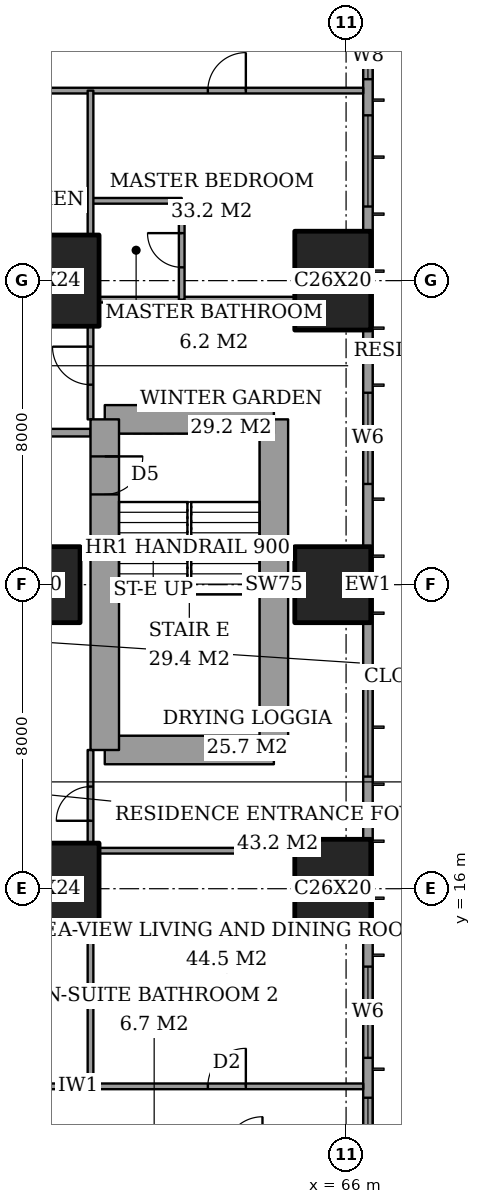
"""IFC4 building model, lengths in metres.
Left out: names, types, materials, properties, quantities, classifications, styles, units other than length and angle.
Written with IfcOpenShell. Run it as: python <this file> out.ifc"""

import sys

from ifc_helpers import new_model, si_unit, direction, frame, frame_2d, origin, origin_2d, place, context, subcontext, project, spatial, rectangle, extrude, element, fill, save


model = new_model("IFC4")
c1 = context("Model", 3, precision=1e-05, world=origin(), true_north=direction((0.0, 1.0)))
c2 = subcontext(c1, "Body", "Model", "MODEL_VIEW")
j1 = project(units=[si_unit("LENGTHUNIT", "METRE"), si_unit("PLANEANGLEUNIT", "RADIAN")], contexts=[c1])
p1 = place(None, origin())
s1 = spatial("IfcSite", under=j1, at=p1, CompositionType="ELEMENT")
p2 = place(p1, origin())
s2 = spatial("IfcBuilding", under=s1, at=p2, CompositionType="ELEMENT")
p3 = place(p2, frame((0.0, 0.0, 47.6)))
s3 = spatial("IfcBuildingStorey", under=s2, at=p3, CompositionType="ELEMENT", Elevation=47.6)
p4 = place(p3, frame((58.0, 16.0, 0.0), z_axis=(0.0, 0.0, 1.0), x_axis=(1.0, 0.0, 0.0)))
e1 = element("IfcColumn", 1, at=p4, inside=s3, PredefinedType="COLUMN", context=c2, shape_type="SweptSolid", body=[
    extrude(rectangle(XDim=3.0, YDim=2.4, at=origin_2d()), origin(), (0.0, 0.0, 1.0), 3.6),
])
p5 = place(p3, frame((58.0, 24.0, 0.0), z_axis=(0.0, 0.0, 1.0), x_axis=(1.0, 0.0, 0.0)))
e2 = element("IfcColumn", 2, at=p5, inside=s3, PredefinedType="COLUMN", context=c2, shape_type="SweptSolid", body=[
    extrude(rectangle(XDim=2.0, YDim=2.0, at=origin_2d()), origin(), (0.0, 0.0, 1.0), 3.6),
])
p6 = place(p3, frame((58.0, 32.0, 0.0), z_axis=(0.0, 0.0, 1.0), x_axis=(1.0, 0.0, 0.0)))
e3 = element("IfcColumn", 3, at=p6, inside=s3, PredefinedType="COLUMN", context=c2, shape_type="SweptSolid", body=[
    extrude(rectangle(XDim=3.0, YDim=2.4, at=origin_2d()), origin(), (0.0, 0.0, 1.0), 3.6),
])
p7 = place(p3, frame((65.65, 16.0, 0.0), z_axis=(0.0, 0.0, 1.0), x_axis=(0.0, 1.0, 0.0)))
e4 = element("IfcColumn", 4, at=p7, inside=s3, PredefinedType="COLUMN", context=c2, shape_type="SweptSolid", body=[
    extrude(rectangle(XDim=2.6, YDim=2.0, at=origin_2d()), origin(), (0.0, 0.0, 1.0), 3.6),
])
p8 = place(p3, frame((65.65, 24.0, 0.0), z_axis=(0.0, 0.0, 1.0), x_axis=(1.0, 0.0, 0.0)))
e5 = element("IfcColumn", 5, at=p8, inside=s3, PredefinedType="COLUMN", context=c2, shape_type="SweptSolid", body=[
    extrude(rectangle(XDim=2.0, YDim=2.0, at=origin_2d()), origin(), (0.0, 0.0, 1.0), 3.6),
])
p9 = place(p3, frame((65.65, 32.0, 0.0), z_axis=(0.0, 0.0, 1.0), x_axis=(0.0, 1.0, 0.0)))
e6 = element("IfcColumn", 6, at=p9, inside=s3, PredefinedType="COLUMN", context=c2, shape_type="SweptSolid", body=[
    extrude(rectangle(XDim=2.6, YDim=2.0, at=origin_2d()), origin(), (0.0, 0.0, 1.0), 3.6),
])
p10 = place(p3, frame((59.65, 19.65, 0.0), z_axis=(0.0, 0.0, 1.0), x_axis=(1.0, 0.0, 0.0)))
e7 = element("IfcWall", 7, at=p10, inside=s3, PredefinedType="SHEAR", context=c2, shape_type="SweptSolid", body=[
    extrude(rectangle(XDim=4.45, YDim=0.75, at=frame_2d((2.225, 0.0))), origin(), (0.0, 0.0, 1.0), 3.6),
])
p11 = place(p3, frame((64.1, 19.65, 0.0), z_axis=(0.0, 0.0, 1.0), x_axis=(0.0, 1.0, 0.0)))
e8 = element("IfcWall", 8, at=p11, inside=s3, PredefinedType="SHEAR", context=c2, shape_type="SweptSolid", body=[
    extrude(rectangle(XDim=8.7, YDim=0.75, at=frame_2d((4.35, 0.0))), origin(), (0.0, 0.0, 1.0), 3.6),
])
p12 = place(p3, frame((64.1, 28.35, 0.0), z_axis=(0.0, 0.0, 1.0), x_axis=(-1.0, 0.0, 0.0)))
e9 = element("IfcWall", 9, at=p12, inside=s3, PredefinedType="SHEAR", context=c2, shape_type="SweptSolid", body=[
    extrude(rectangle(XDim=4.45, YDim=0.75, at=frame_2d((2.225, 0.0))), origin(), (0.0, 0.0, 1.0), 3.6),
])
p13 = place(p3, frame((59.65, 28.35, 0.0), z_axis=(0.0, 0.0, 1.0), x_axis=(0.0, -1.0, 0.0)))
e10 = element("IfcWall", 10, at=p13, inside=s3, PredefinedType="SHEAR", context=c2, shape_type="SweptSolid", body=[
    extrude(rectangle(XDim=8.7, YDim=0.75, at=frame_2d((4.35, 0.0))), origin(), (0.0, 0.0, 1.0), 3.6),
])
p14 = place(p13, frame((0.975, 0.0, 0.0)))
e11 = element("IfcOpeningElement", 11, at=p14, cuts=e10, PredefinedType="OPENING", context=c2, shape_type="SweptSolid", body=[
    extrude(rectangle(XDim=1.0, YDim=2.1, at=frame_2d((0.5, 1.05))), frame((0.0, 0.385, 0.0), z_axis=(0.0, -1.0, 0.0), x_axis=(1.0, 0.0, 0.0)), (0.0, 0.0, 1.0), 0.77),
])
p15 = place(p3, frame((66.575, 3.175, 0.0), z_axis=(0.0, 0.0, 1.0), x_axis=(0.0, 1.0, 0.0)))
e12 = element("IfcWall", 12, at=p15, inside=s3, PredefinedType="SOLIDWALL", context=c2, shape_type="SweptSolid", body=[
    extrude(rectangle(XDim=41.65, YDim=0.25, at=frame_2d((20.825, 0.0))), origin(), (0.0, 0.0, 1.0), 3.6),
])
p16 = place(p15, frame((0.775, 0.0, 0.6)))
e13 = element("IfcOpeningElement", 13, at=p16, cuts=e12, PredefinedType="OPENING", context=c2, shape_type="SweptSolid", body=[
    extrude(rectangle(XDim=2.4, YDim=2.0, at=frame_2d((1.2, 1.0))), frame((0.0, 0.135, 0.0), z_axis=(0.0, -1.0, 0.0), x_axis=(1.0, 0.0, 0.0)), (0.0, 0.0, 1.0), 0.27),
])
p17 = place(p15, frame((6.125, 0.0, 0.6)))
e14 = element("IfcOpeningElement", 14, at=p17, cuts=e12, PredefinedType="OPENING", context=c2, shape_type="SweptSolid", body=[
    extrude(rectangle(XDim=1.2, YDim=2.0, at=frame_2d((0.6, 1.0))), frame((0.0, 0.135, 0.0), z_axis=(0.0, -1.0, 0.0), x_axis=(1.0, 0.0, 0.0)), (0.0, 0.0, 1.0), 0.27),
])
p18 = place(p15, frame((8.375, 0.0, 0.6)))
e15 = element("IfcOpeningElement", 15, at=p18, cuts=e12, PredefinedType="OPENING", context=c2, shape_type="SweptSolid", body=[
    extrude(rectangle(XDim=2.4, YDim=2.0, at=frame_2d((1.2, 1.0))), frame((0.0, 0.135, 0.0), z_axis=(0.0, -1.0, 0.0), x_axis=(1.0, 0.0, 0.0)), (0.0, 0.0, 1.0), 0.27),
])
p19 = place(p15, frame((15.775, 0.0, 0.6)))
e16 = element("IfcOpeningElement", 16, at=p19, cuts=e12, PredefinedType="OPENING", context=c2, shape_type="SweptSolid", body=[
    extrude(rectangle(XDim=2.4, YDim=2.0, at=frame_2d((1.2, 1.0))), frame((0.0, 0.135, 0.0), z_axis=(0.0, -1.0, 0.0), x_axis=(1.0, 0.0, 0.0)), (0.0, 0.0, 1.0), 0.27),
])
p20 = place(p15, frame((23.475, 0.0, 0.6)))
e17 = element("IfcOpeningElement", 17, at=p20, cuts=e12, PredefinedType="OPENING", context=c2, shape_type="SweptSolid", body=[
    extrude(rectangle(XDim=2.4, YDim=2.0, at=frame_2d((1.2, 1.0))), frame((0.0, 0.135, 0.0), z_axis=(0.0, -1.0, 0.0), x_axis=(1.0, 0.0, 0.0)), (0.0, 0.0, 1.0), 0.27),
])
p21 = place(p15, frame((30.775, 0.0, 0.6)))
e18 = element("IfcOpeningElement", 18, at=p21, cuts=e12, PredefinedType="OPENING", context=c2, shape_type="SweptSolid", body=[
    extrude(rectangle(XDim=2.4, YDim=2.0, at=frame_2d((1.2, 1.0))), frame((0.0, 0.135, 0.0), z_axis=(0.0, -1.0, 0.0), x_axis=(1.0, 0.0, 0.0)), (0.0, 0.0, 1.0), 0.27),
])
p22 = place(p15, frame((34.125, 0.0, 0.6)))
e19 = element("IfcOpeningElement", 19, at=p22, cuts=e12, PredefinedType="OPENING", context=c2, shape_type="SweptSolid", body=[
    extrude(rectangle(XDim=1.2, YDim=2.0, at=frame_2d((0.6, 1.0))), frame((0.0, 0.135, 0.0), z_axis=(0.0, -1.0, 0.0), x_axis=(1.0, 0.0, 0.0)), (0.0, 0.0, 1.0), 0.27),
])
p23 = place(p15, frame((38.475, 0.0, 0.6)))
e20 = element("IfcOpeningElement", 20, at=p23, cuts=e12, PredefinedType="OPENING", context=c2, shape_type="SweptSolid", body=[
    extrude(rectangle(XDim=2.4, YDim=2.0, at=frame_2d((1.2, 1.0))), frame((0.0, 0.135, 0.0), z_axis=(0.0, -1.0, 0.0), x_axis=(1.0, 0.0, 0.0)), (0.0, 0.0, 1.0), 0.27),
])
p24 = place(p3, frame((41.439, 10.8, 0.0), z_axis=(0.0, 0.0, 1.0), x_axis=(1.0, 0.0, 0.0)))
e21 = element("IfcWall", 21, at=p24, inside=s3, PredefinedType="PARTITIONING", context=c2, shape_type="SweptSolid", body=[
    extrude(rectangle(XDim=25.011, YDim=0.15, at=frame_2d((12.505, 0.0))), origin(), (0.0, 0.0, 1.0), 3.35),
])
p25 = place(p24, frame((12.361, 0.0, 0.0)))
e22 = element("IfcOpeningElement", 22, at=p25, cuts=e21, PredefinedType="OPENING", context=c2, shape_type="SweptSolid", body=[
    extrude(rectangle(XDim=1.0, YDim=2.1, at=frame_2d((0.5, 1.05))), frame((0.0, 0.085, 0.0), z_axis=(0.0, -1.0, 0.0), x_axis=(1.0, 0.0, 0.0)), (0.0, 0.0, 1.0), 0.17),
])
p26 = place(p24, frame((20.924, 0.0, 0.0)))
e23 = element("IfcOpeningElement", 23, at=p26, cuts=e21, PredefinedType="OPENING", context=c2, shape_type="SweptSolid", body=[
    extrude(rectangle(XDim=1.0, YDim=2.1, at=frame_2d((0.5, 1.05))), frame((0.0, 0.085, 0.0), z_axis=(0.0, -1.0, 0.0), x_axis=(1.0, 0.0, 0.0)), (0.0, 0.0, 1.0), 0.17),
])
p27 = place(p24, frame((15.448, 0.0, 0.0)))
e24 = element("IfcOpeningElement", 24, at=p27, cuts=e21, PredefinedType="OPENING", context=c2, shape_type="SweptSolid", body=[
    extrude(rectangle(XDim=0.9, YDim=2.1, at=frame_2d((0.45, 1.05))), frame((0.0, 0.085, 0.0), z_axis=(0.0, -1.0, 0.0), x_axis=(1.0, 0.0, 0.0)), (0.0, 0.0, 1.0), 0.17),
])
p28 = place(p24, frame((9.961, 0.0, 0.0)))
e25 = element("IfcOpeningElement", 25, at=p28, cuts=e21, PredefinedType="OPENING", context=c2, shape_type="SweptSolid", body=[
    extrude(rectangle(XDim=1.0, YDim=2.1, at=frame_2d((0.5, 1.05))), frame((0.0, 0.085, 0.0), z_axis=(0.0, -1.0, 0.0), x_axis=(1.0, 0.0, 0.0)), (0.0, 0.0, 1.0), 0.17),
])
p29 = place(p24, frame((7.361, 0.0, 0.0)))
e26 = element("IfcOpeningElement", 26, at=p29, cuts=e21, PredefinedType="OPENING", context=c2, shape_type="SweptSolid", body=[
    extrude(rectangle(XDim=1.0, YDim=2.1, at=frame_2d((0.5, 1.05))), frame((0.0, 0.085, 0.0), z_axis=(0.0, -1.0, 0.0), x_axis=(1.0, 0.0, 0.0)), (0.0, 0.0, 1.0), 0.17),
])
p30 = place(p24, frame((2.836, 0.0, 0.0)))
e27 = element("IfcOpeningElement", 27, at=p30, cuts=e21, PredefinedType="OPENING", context=c2, shape_type="SweptSolid", body=[
    extrude(rectangle(XDim=1.0, YDim=2.1, at=frame_2d((0.5, 1.05))), frame((0.0, 0.085, 0.0), z_axis=(0.0, -1.0, 0.0), x_axis=(1.0, 0.0, 0.0)), (0.0, 0.0, 1.0), 0.17),
])
p31 = place(p3, frame((59.5, 17.0, 0.0), z_axis=(0.0, 0.0, 1.0), x_axis=(1.0, 0.0, 0.0)))
e28 = element("IfcWall", 28, at=p31, inside=s3, PredefinedType="PARTITIONING", context=c2, shape_type="SweptSolid", body=[
    extrude(rectangle(XDim=5.15, YDim=0.15, at=frame_2d((2.575, 0.0))), origin(), (0.0, 0.0, 1.0), 3.35),
])
p32 = place(p3, frame((42.0, 28.0, 0.0), z_axis=(0.0, 0.0, 1.0), x_axis=(1.0, 0.0, 0.0)))
e29 = element("IfcWall", 29, at=p32, inside=s3, PredefinedType="PARTITIONING", context=c2, shape_type="SweptSolid", body=[
    extrude(rectangle(XDim=17.275, YDim=0.2, at=frame_2d((8.637, 0.0))), origin(), (0.0, 0.0, 1.0), 3.35),
])
p33 = place(p32, frame((9.2, 0.0, 0.0)))
e30 = element("IfcOpeningElement", 30, at=p33, cuts=e29, PredefinedType="OPENING", context=c2, shape_type="SweptSolid", body=[
    extrude(rectangle(XDim=1.2, YDim=2.4, at=frame_2d((0.6, 1.2))), frame((0.0, 0.11, 0.0), z_axis=(0.0, -1.0, 0.0), x_axis=(1.0, 0.0, 0.0)), (0.0, 0.0, 1.0), 0.22),
])
p34 = place(p3, frame((59.5, 31.5, 0.0), z_axis=(0.0, 0.0, 1.0), x_axis=(1.0, 0.0, 0.0)))
e31 = element("IfcWall", 31, at=p34, inside=s3, PredefinedType="PARTITIONING", context=c2, shape_type="SweptSolid", body=[
    extrude(rectangle(XDim=5.15, YDim=0.15, at=frame_2d((2.575, 0.0))), origin(), (0.0, 0.0, 1.0), 3.35),
])
p35 = place(p3, frame((59.275, 34.1, 0.0), z_axis=(0.0, 0.0, 1.0), x_axis=(1.0, 0.0, 0.0)))
e32 = element("IfcWall", 32, at=p35, inside=s3, PredefinedType="PARTITIONING", context=c2, shape_type="SweptSolid", body=[
    extrude(rectangle(XDim=2.4, YDim=0.15, at=frame_2d((1.2, 0.0))), origin(), (0.0, 0.0, 1.0), 3.35),
])
p36 = place(p3, frame((41.439, 37.0, 0.0), z_axis=(0.0, 0.0, 1.0), x_axis=(1.0, 0.0, 0.0)))
e33 = element("IfcWall", 33, at=p36, inside=s3, PredefinedType="PARTITIONING", context=c2, shape_type="SweptSolid", body=[
    extrude(rectangle(XDim=25.011, YDim=0.15, at=frame_2d((12.505, 0.0))), origin(), (0.0, 0.0, 1.0), 3.35),
])
p37 = place(p36, frame((12.561, 0.0, 0.0)))
e34 = element("IfcOpeningElement", 34, at=p37, cuts=e33, PredefinedType="OPENING", context=c2, shape_type="SweptSolid", body=[
    extrude(rectangle(XDim=1.0, YDim=2.1, at=frame_2d((0.5, 1.05))), frame((0.0, 0.085, 0.0), z_axis=(0.0, -1.0, 0.0), x_axis=(1.0, 0.0, 0.0)), (0.0, 0.0, 1.0), 0.17),
])
p38 = place(p36, frame((20.924, 0.0, 0.0)))
e35 = element("IfcOpeningElement", 35, at=p38, cuts=e33, PredefinedType="OPENING", context=c2, shape_type="SweptSolid", body=[
    extrude(rectangle(XDim=1.0, YDim=2.1, at=frame_2d((0.5, 1.05))), frame((0.0, 0.085, 0.0), z_axis=(0.0, -1.0, 0.0), x_axis=(1.0, 0.0, 0.0)), (0.0, 0.0, 1.0), 0.17),
])
p39 = place(p36, frame((15.499, 0.0, 0.0)))
e36 = element("IfcOpeningElement", 36, at=p39, cuts=e33, PredefinedType="OPENING", context=c2, shape_type="SweptSolid", body=[
    extrude(rectangle(XDim=1.0, YDim=2.1, at=frame_2d((0.5, 1.05))), frame((0.0, 0.085, 0.0), z_axis=(0.0, -1.0, 0.0), x_axis=(1.0, 0.0, 0.0)), (0.0, 0.0, 1.0), 0.17),
])
p40 = place(p36, frame((8.761, 0.0, 0.0)))
e37 = element("IfcOpeningElement", 37, at=p40, cuts=e33, PredefinedType="OPENING", context=c2, shape_type="SweptSolid", body=[
    extrude(rectangle(XDim=1.0, YDim=2.1, at=frame_2d((0.5, 1.05))), frame((0.0, 0.085, 0.0), z_axis=(0.0, -1.0, 0.0), x_axis=(1.0, 0.0, 0.0)), (0.0, 0.0, 1.0), 0.17),
])
p41 = place(p36, frame((2.836, 0.0, 0.0)))
e38 = element("IfcOpeningElement", 38, at=p41, cuts=e33, PredefinedType="OPENING", context=c2, shape_type="SweptSolid", body=[
    extrude(rectangle(XDim=1.0, YDim=2.1, at=frame_2d((0.5, 1.05))), frame((0.0, 0.085, 0.0), z_axis=(0.0, -1.0, 0.0), x_axis=(1.0, 0.0, 0.0)), (0.0, 0.0, 1.0), 0.17),
])
p42 = place(p3, frame((59.275, 10.8, 0.0), z_axis=(0.0, 0.0, 1.0), x_axis=(0.0, 1.0, 0.0)))
e39 = element("IfcWall", 39, at=p42, inside=s3, PredefinedType="PARTITIONING", context=c2, shape_type="SweptSolid", body=[
    extrude(rectangle(XDim=4.0, YDim=0.15, at=frame_2d((2.0, 0.0))), origin(), (0.0, 0.0, 1.0), 3.35),
])
p43 = place(p3, frame((59.275, 17.2, 0.0), z_axis=(0.0, 0.0, 1.0), x_axis=(0.0, 1.0, 0.0)))
e40 = element("IfcWall", 40, at=p43, inside=s3, PredefinedType="PARTITIONING", context=c2, shape_type="SweptSolid", body=[
    extrude(rectangle(XDim=2.45, YDim=0.15, at=frame_2d((1.225, 0.0))), origin(), (0.0, 0.0, 1.0), 3.35),
])
p44 = place(p43, frame((0.587, 0.0, 0.0)))
e41 = element("IfcOpeningElement", 41, at=p44, cuts=e40, PredefinedType="OPENING", context=c2, shape_type="SweptSolid", body=[
    extrude(rectangle(XDim=0.9, YDim=2.1, at=frame_2d((0.45, 1.05))), frame((0.0, 0.085, 0.0), z_axis=(0.0, -1.0, 0.0), x_axis=(1.0, 0.0, 0.0)), (0.0, 0.0, 1.0), 0.17),
])
p45 = place(p3, frame((59.275, 28.35, 0.0), z_axis=(0.0, 0.0, 1.0), x_axis=(0.0, 1.0, 0.0)))
e42 = element("IfcWall", 42, at=p45, inside=s3, PredefinedType="PARTITIONING", context=c2, shape_type="SweptSolid", body=[
    extrude(rectangle(XDim=2.45, YDim=0.15, at=frame_2d((1.225, 0.0))), origin(), (0.0, 0.0, 1.0), 3.35),
])
p46 = place(p45, frame((0.913, 0.0, 0.0)))
e43 = element("IfcOpeningElement", 43, at=p46, cuts=e42, PredefinedType="OPENING", context=c2, shape_type="SweptSolid", body=[
    extrude(rectangle(XDim=1.0, YDim=2.1, at=frame_2d((0.5, 1.05))), frame((0.0, 0.085, 0.0), z_axis=(0.0, -1.0, 0.0), x_axis=(1.0, 0.0, 0.0)), (0.0, 0.0, 1.0), 0.17),
])
p47 = place(p3, frame((59.275, 33.2, 0.0), z_axis=(0.0, 0.0, 1.0), x_axis=(0.0, 1.0, 0.0)))
e44 = element("IfcWall", 44, at=p47, inside=s3, PredefinedType="PARTITIONING", context=c2, shape_type="SweptSolid", body=[
    extrude(rectangle(XDim=3.8, YDim=0.15, at=frame_2d((1.9, 0.0))), origin(), (0.0, 0.0, 1.0), 3.35),
])
p48 = place(p3, frame((61.675, 31.5, 0.0), z_axis=(0.0, 0.0, 1.0), x_axis=(0.0, 1.0, 0.0)))
e45 = element("IfcWall", 45, at=p48, inside=s3, PredefinedType="PARTITIONING", context=c2, shape_type="SweptSolid", body=[
    extrude(rectangle(XDim=2.6, YDim=0.15, at=frame_2d((1.3, 0.0))), origin(), (0.0, 0.0, 1.0), 3.35),
])
p49 = place(p48, frame((0.85, 0.0, 0.0)))
e46 = element("IfcOpeningElement", 46, at=p49, cuts=e45, PredefinedType="OPENING", context=c2, shape_type="SweptSolid", body=[
    extrude(rectangle(XDim=0.9, YDim=2.1, at=frame_2d((0.45, 1.05))), frame((0.0, 0.085, 0.0), z_axis=(0.0, -1.0, 0.0), x_axis=(1.0, 0.0, 0.0)), (0.0, 0.0, 1.0), 0.17),
])
p50 = place(p17, origin())
e47 = element("IfcWindow", 47, at=p50, inside=s3, PartitioningType="SINGLE_PANEL", PredefinedType="WINDOW", context=c2, shape_type="SweptSolid", body=[
    extrude(rectangle(XDim=1.2, YDim=2.0, at=frame_2d((0.6, 1.0))), frame((0.0, 0.03, 0.0), z_axis=(0.0, -1.0, 0.0), x_axis=(1.0, 0.0, 0.0)), (0.0, 0.0, 1.0), 0.06),
])
fill(e14, e47)
p51 = place(p18, origin())
e48 = element("IfcWindow", 48, at=p51, inside=s3, PartitioningType="SINGLE_PANEL", PredefinedType="WINDOW", context=c2, shape_type="SweptSolid", body=[
    extrude(rectangle(XDim=2.4, YDim=2.0, at=frame_2d((1.2, 1.0))), frame((0.0, 0.03, 0.0), z_axis=(0.0, -1.0, 0.0), x_axis=(1.0, 0.0, 0.0)), (0.0, 0.0, 1.0), 0.06),
])
fill(e15, e48)
p52 = place(p19, origin())
e49 = element("IfcWindow", 49, at=p52, inside=s3, PartitioningType="SINGLE_PANEL", PredefinedType="WINDOW", context=c2, shape_type="SweptSolid", body=[
    extrude(rectangle(XDim=2.4, YDim=2.0, at=frame_2d((1.2, 1.0))), frame((0.0, 0.03, 0.0), z_axis=(0.0, -1.0, 0.0), x_axis=(1.0, 0.0, 0.0)), (0.0, 0.0, 1.0), 0.06),
])
fill(e16, e49)
p53 = place(p20, origin())
e50 = element("IfcWindow", 50, at=p53, inside=s3, PartitioningType="SINGLE_PANEL", PredefinedType="WINDOW", context=c2, shape_type="SweptSolid", body=[
    extrude(rectangle(XDim=2.4, YDim=2.0, at=frame_2d((1.2, 1.0))), frame((0.0, 0.03, 0.0), z_axis=(0.0, -1.0, 0.0), x_axis=(1.0, 0.0, 0.0)), (0.0, 0.0, 1.0), 0.06),
])
fill(e17, e50)
p54 = place(p21, origin())
e51 = element("IfcWindow", 51, at=p54, inside=s3, PartitioningType="SINGLE_PANEL", PredefinedType="WINDOW", context=c2, shape_type="SweptSolid", body=[
    extrude(rectangle(XDim=2.4, YDim=2.0, at=frame_2d((1.2, 1.0))), frame((0.0, 0.03, 0.0), z_axis=(0.0, -1.0, 0.0), x_axis=(1.0, 0.0, 0.0)), (0.0, 0.0, 1.0), 0.06),
])
fill(e18, e51)
p55 = place(p22, origin())
e52 = element("IfcWindow", 52, at=p55, inside=s3, PartitioningType="SINGLE_PANEL", PredefinedType="WINDOW", context=c2, shape_type="SweptSolid", body=[
    extrude(rectangle(XDim=1.2, YDim=2.0, at=frame_2d((0.6, 1.0))), frame((0.0, 0.03, 0.0), z_axis=(0.0, -1.0, 0.0), x_axis=(1.0, 0.0, 0.0)), (0.0, 0.0, 1.0), 0.06),
])
fill(e19, e52)
p56 = place(p26, origin())
e53 = element("IfcDoor", 53, at=p56, inside=s3, OperationType="SINGLE_SWING_LEFT", PredefinedType="DOOR", context=c2, shape_type="SweptSolid", body=[
    extrude(rectangle(XDim=1.0, YDim=2.1, at=frame_2d((0.5, 1.05))), frame((0.0, 0.025, 0.0), z_axis=(0.0, -1.0, 0.0), x_axis=(1.0, 0.0, 0.0)), (0.0, 0.0, 1.0), 0.05),
])
fill(e23, e53)
p57 = place(p44, origin())
e54 = element("IfcDoor", 54, at=p57, inside=s3, OperationType="SINGLE_SWING_RIGHT", PredefinedType="DOOR", context=c2, shape_type="SweptSolid", body=[
    extrude(rectangle(XDim=0.9, YDim=2.1, at=frame_2d((0.45, 1.05))), frame((0.0, 0.025, 0.0), z_axis=(0.0, -1.0, 0.0), x_axis=(1.0, 0.0, 0.0)), (0.0, 0.0, 1.0), 0.05),
])
fill(e41, e54)
p58 = place(p49, origin())
e55 = element("IfcDoor", 55, at=p58, inside=s3, OperationType="SINGLE_SWING_LEFT", PredefinedType="DOOR", context=c2, shape_type="SweptSolid", body=[
    extrude(rectangle(XDim=0.9, YDim=2.1, at=frame_2d((0.45, 1.05))), frame((0.0, 0.025, 0.0), z_axis=(0.0, -1.0, 0.0), x_axis=(1.0, 0.0, 0.0)), (0.0, 0.0, 1.0), 0.05),
])
fill(e46, e55)
p59 = place(p38, origin())
e56 = element("IfcDoor", 56, at=p59, inside=s3, OperationType="SINGLE_SWING_LEFT", PredefinedType="DOOR", context=c2, shape_type="SweptSolid", body=[
    extrude(rectangle(XDim=1.0, YDim=2.1, at=frame_2d((0.5, 1.05))), frame((0.0, 0.025, 0.0), z_axis=(0.0, -1.0, 0.0), x_axis=(1.0, 0.0, 0.0)), (0.0, 0.0, 1.0), 0.05),
])
fill(e35, e56)
p60 = place(p46, origin())
e57 = element("IfcDoor", 57, at=p60, inside=s3, OperationType="SINGLE_SWING_LEFT", PredefinedType="DOOR", context=c2, shape_type="SweptSolid", body=[
    extrude(rectangle(XDim=1.0, YDim=2.1, at=frame_2d((0.5, 1.05))), frame((0.0, 0.025, 0.0), z_axis=(0.0, -1.0, 0.0), x_axis=(1.0, 0.0, 0.0)), (0.0, 0.0, 1.0), 0.05),
])
fill(e43, e57)
p61 = place(p14, origin())
e58 = element("IfcDoor", 58, at=p61, inside=s3, OperationType="SINGLE_SWING_RIGHT", PredefinedType="DOOR", context=c2, shape_type="SweptSolid", body=[
    extrude(rectangle(XDim=1.0, YDim=2.1, at=frame_2d((0.5, 1.05))), frame((0.0, 0.025, 0.0), z_axis=(0.0, -1.0, 0.0), x_axis=(1.0, 0.0, 0.0)), (0.0, 0.0, 1.0), 0.05),
])
fill(e11, e58)
save(model, sys.argv[1])
